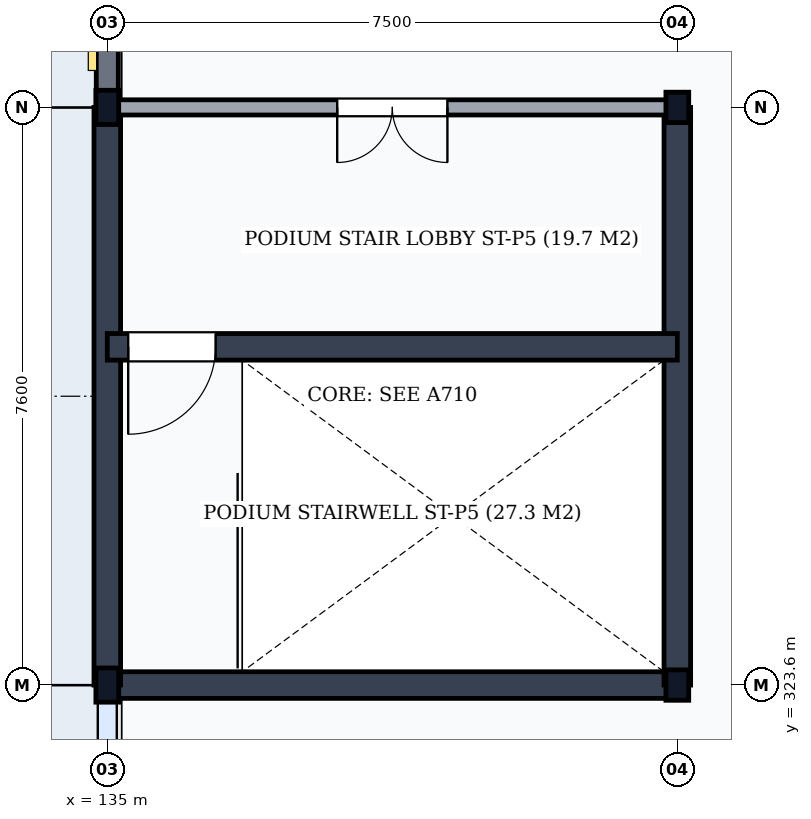
"""IFC4 building model, lengths in metres.
Left out: names, types, materials, properties, quantities, classifications, styles, units other than length and angle.
Written with IfcOpenShell. Run it as: python <this file> out.ifc"""

import sys

from ifc_helpers import new_model, si_unit, direction, frame, frame_2d, origin, origin_2d, place, context, subcontext, project, spatial, rectangle, i_section, extrude, element, fill, save


model = new_model("IFC4")
c1 = context("Model", 3, precision=1e-05, world=origin(), true_north=direction((0.0, 1.0)))
c2 = subcontext(c1, "Body", "Model", "MODEL_VIEW")
j1 = project(units=[si_unit("LENGTHUNIT", "METRE"), si_unit("PLANEANGLEUNIT", "RADIAN")], contexts=[c1])
p1 = place(None, origin())
s1 = spatial("IfcSite", under=j1, at=p1, CompositionType="ELEMENT")
p2 = place(p1, origin())
s2 = spatial("IfcBuilding", under=s1, at=p2, CompositionType="ELEMENT")
p3 = place(p2, frame((0.0, 0.0, 5.4)))
s3 = spatial("IfcBuildingStorey", under=s2, at=p3, CompositionType="ELEMENT", Elevation=5.4)
for number, where, z_axis, x_axis in (
    (1, (135.0, 323.6, 0.0), (0.0, 0.0, 1.0), (1.0, 0.0, 0.0)),
    (2, (135.0, 331.2, 0.0), (0.0, 0.0, 1.0), (1.0, 0.0, 0.0)),
):
    element("IfcColumn", number, at=place(p3, frame(where, z_axis=z_axis, x_axis=x_axis)), inside=s3, PredefinedType="COLUMN", context=c2, shape_type="SweptSolid", body=[
        extrude(i_section(OverallWidth=0.3, OverallDepth=0.45, WebThickness=0.014, FlangeThickness=0.026, FilletRadius=0.027, at=origin_2d()), origin(), (0.0, 0.0, 1.0), 5.1),
    ])
for number, where, z_axis, x_axis in (
    (3, (142.5, 323.6, 0.0), (0.0, 0.0, 1.0), (1.0, 0.0, 0.0)),
    (4, (142.5, 331.2, 0.0), (0.0, 0.0, 1.0), (1.0, 0.0, 0.0)),
):
    element("IfcColumn", number, at=place(p3, frame(where, z_axis=z_axis, x_axis=x_axis)), inside=s3, PredefinedType="COLUMN", context=c2, shape_type="SweptSolid", body=[
        extrude(i_section(OverallWidth=0.3, OverallDepth=0.4, WebThickness=0.013, FlangeThickness=0.024, FilletRadius=0.027, at=origin_2d()), origin(), (0.0, 0.0, 1.0), 5.1),
    ])
p4 = place(p3, frame((135.0, 331.206, 0.0), z_axis=(0.0, 0.0, 1.0), x_axis=(0.0, 1.0, 0.0)))
e5 = element("IfcWall", 5, at=p4, inside=s3, PredefinedType="SOLIDWALL", context=c2, shape_type="SweptSolid", body=[
    extrude(rectangle(XDim=6.788, YDim=0.29, at=frame_2d((3.394, 0.0))), origin(), (0.0, 0.0, 1.0), 4.618),
])
p5 = place(p4, frame((2.594, 0.0, 0.95)))
e6 = element("IfcOpeningElement", 6, at=p5, cuts=e5, PredefinedType="OPENING", context=c2, shape_type="SweptSolid", body=[
    extrude(rectangle(XDim=1.6, YDim=2.4, at=frame_2d((0.8, 1.2))), frame((0.0, 0.16, 0.0), z_axis=(0.0, -1.0, 0.0), x_axis=(1.0, 0.0, 0.0)), (0.0, 0.0, 1.0), 0.32),
])
p6 = place(p3, frame((135.1, 248.6, 5.1), z_axis=(0.0, 0.0, 1.0), x_axis=(0.0, 1.0, 0.0)))
e7 = element("IfcWall", 7, at=p6, inside=s3, PredefinedType="PARAPET", context=c2, shape_type="SweptSolid", body=[
    extrude(rectangle(XDim=89.2, YDim=0.18, at=frame_2d((44.6, 0.0))), origin(), (0.0, 0.0, 1.0), 1.2),
])
p7 = place(p3, frame((135.0, 323.6, 0.0), z_axis=(0.0, 0.0, 1.0), x_axis=(1.0, 0.0, 0.0)))
e8 = element("IfcWall", 8, at=p7, inside=s3, PredefinedType="SHEAR", context=c2, shape_type="SweptSolid", body=[
    extrude(rectangle(XDim=7.5, YDim=0.35, at=frame_2d((3.75, 0.0))), origin(), (0.0, 0.0, 1.0), 4.85),
])
for number, where, z_axis, x_axis in (
    (9, (135.0, 323.6, 0.0), (0.0, 0.0, 1.0), (0.0, 1.0, 0.0)),
    (10, (142.5, 323.6, 0.0), (0.0, 0.0, 1.0), (0.0, 1.0, 0.0)),
):
    element("IfcWall", number, at=place(p3, frame(where, z_axis=z_axis, x_axis=x_axis)), inside=s3, PredefinedType="SHEAR", context=c2, shape_type="SweptSolid", body=[
        extrude(rectangle(XDim=7.6, YDim=0.35, at=frame_2d((3.8, 0.0))), origin(), (0.0, 0.0, 1.0), 4.85),
    ])
p8 = place(p3, frame((135.0, 328.05, 0.0), z_axis=(0.0, 0.0, 1.0), x_axis=(1.0, 0.0, 0.0)))
e11 = element("IfcWall", 11, at=p8, inside=s3, PredefinedType="SHEAR", context=c2, shape_type="SweptSolid", body=[
    extrude(rectangle(XDim=7.5, YDim=0.35, at=frame_2d((3.75, 0.0))), origin(), (0.0, 0.0, 1.0), 4.85),
])
p9 = place(p8, frame((0.275, 0.0, 0.0)))
e12 = element("IfcOpeningElement", 12, at=p9, cuts=e11, PredefinedType="OPENING", context=c2, shape_type="SweptSolid", body=[
    extrude(rectangle(XDim=1.15, YDim=2.15, at=frame_2d((0.575, 1.075))), frame((0.0, 0.19, 0.0), z_axis=(0.0, -1.0, 0.0), x_axis=(1.0, 0.0, 0.0)), (0.0, 0.0, 1.0), 0.38),
])
p10 = place(p3, frame((135.0, 331.2, 0.0), z_axis=(0.0, 0.0, 1.0), x_axis=(1.0, 0.0, 0.0)))
e13 = element("IfcWall", 13, at=p10, inside=s3, PredefinedType="PARTITIONING", context=c2, shape_type="SweptSolid", body=[
    extrude(rectangle(XDim=7.5, YDim=0.2, at=frame_2d((3.75, 0.0))), origin(), (0.0, 0.0, 1.0), 4.488),
])
p11 = place(p10, frame((3.025, 0.0, 0.0)))
e14 = element("IfcOpeningElement", 14, at=p11, cuts=e13, PredefinedType="OPENING", context=c2, shape_type="SweptSolid", body=[
    extrude(rectangle(XDim=1.45, YDim=2.2, at=frame_2d((0.725, 1.1))), frame((0.0, 0.115, 0.0), z_axis=(0.0, -1.0, 0.0), x_axis=(1.0, 0.0, 0.0)), (0.0, 0.0, 1.0), 0.23),
])
p12 = place(p9, frame((1.15, 0.0, 0.0), z_axis=(0.0, 0.0, 1.0), x_axis=(-1.0, 0.0, 0.0)))
e15 = element("IfcDoor", 15, at=p12, inside=s3, OperationType="SINGLE_SWING_RIGHT", PredefinedType="DOOR", context=c2, shape_type="SweptSolid", body=[
    extrude(rectangle(XDim=1.15, YDim=2.15, at=frame_2d((0.575, 1.075))), frame((0.0, 0.025, 0.0), z_axis=(0.0, -1.0, 0.0), x_axis=(1.0, 0.0, 0.0)), (0.0, 0.0, 1.0), 0.05),
])
fill(e12, e15)
p13 = place(p11, frame((1.45, 0.0, 0.0), z_axis=(0.0, 0.0, 1.0), x_axis=(-1.0, 0.0, 0.0)))
e16 = element("IfcDoor", 16, at=p13, inside=s3, OperationType="DOUBLE_DOOR_SINGLE_SWING", PredefinedType="DOOR", context=c2, shape_type="SweptSolid", body=[
    extrude(rectangle(XDim=1.45, YDim=2.2, at=frame_2d((0.725, 1.1))), frame((0.0, 0.025, 0.0), z_axis=(0.0, -1.0, 0.0), x_axis=(1.0, 0.0, 0.0)), (0.0, 0.0, 1.0), 0.05),
])
fill(e14, e16)
save(model, sys.argv[1])
